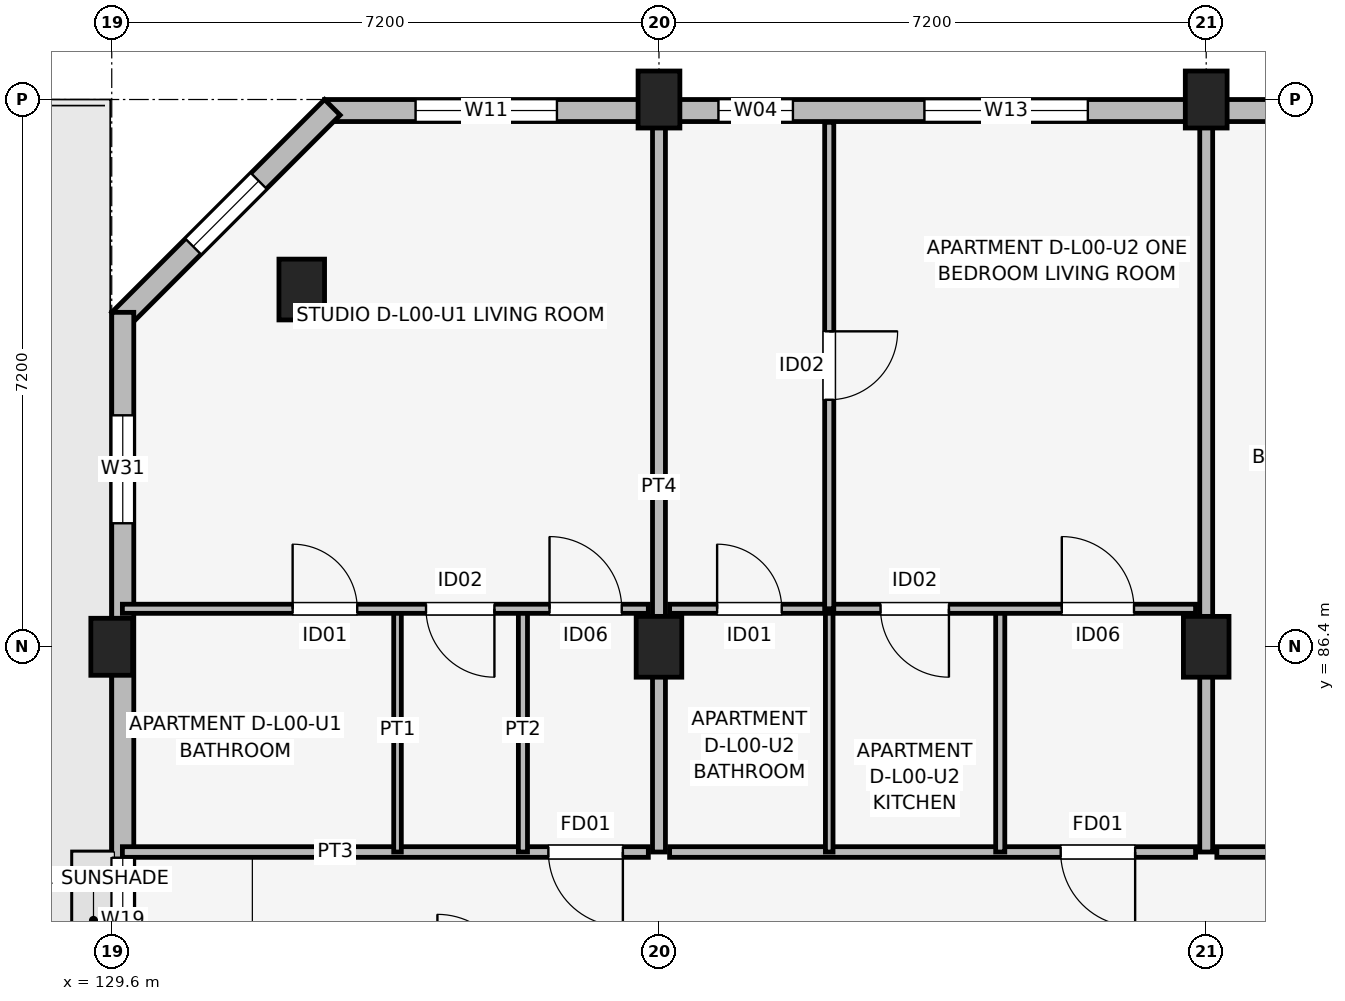
"""IFC4 building model, lengths in metres.
Left out: names, types, materials, properties, quantities, classifications, styles, units other than length and angle.
Written with IfcOpenShell. Run it as: python <this file> out.ifc"""

import sys

from ifc_helpers import new_model, si_unit, direction, frame, frame_2d, origin, origin_2d, place, context, subcontext, project, spatial, rectangle, extrude, element, fill, save


model = new_model("IFC4")
c1 = context("Model", 3, precision=1e-05, world=origin(), true_north=direction((0.0, 1.0)))
c2 = subcontext(c1, "Body", "Model", "MODEL_VIEW")
j1 = project(units=[si_unit("LENGTHUNIT", "METRE"), si_unit("PLANEANGLEUNIT", "RADIAN")], contexts=[c1])
p1 = place(None, origin())
s1 = spatial("IfcSite", under=j1, at=p1, CompositionType="ELEMENT")
p2 = place(p1, origin())
s2 = spatial("IfcBuilding", under=s1, at=p2, CompositionType="ELEMENT")
p3 = place(p2, origin())
s3 = spatial("IfcBuildingStorey", under=s2, at=p3, CompositionType="ELEMENT", Elevation=0.0)
p4 = place(p3, frame((129.6, 86.4, 0.0), z_axis=(0.0, 0.0, 1.0), x_axis=(1.0, 0.0, 0.0)))
e1 = element("IfcColumn", 1, at=p4, inside=s3, PredefinedType="COLUMN", context=c2, shape_type="SweptSolid", body=[
    extrude(rectangle(XDim=0.55, YDim=0.75, at=origin_2d()), origin(), (0.0, 0.0, 1.0), 4.5),
])
for number, where, z_axis, x_axis in (
    (2, (132.1, 91.1, 0.0), (0.0, 0.0, 1.0), (1.0, 0.0, 0.0)),
    (3, (136.8, 86.4, 0.0), (0.0, 0.0, 1.0), (1.0, 0.0, 0.0)),
):
    element("IfcColumn", number, at=place(p3, frame(where, z_axis=z_axis, x_axis=x_axis)), inside=s3, PredefinedType="COLUMN", context=c2, shape_type="SweptSolid", body=[
        extrude(rectangle(XDim=0.6, YDim=0.8, at=origin_2d()), origin(), (0.0, 0.0, 1.0), 4.5),
    ])
p5 = place(p3, frame((136.8, 93.6, 0.0), z_axis=(0.0, 0.0, 1.0), x_axis=(1.0, 0.0, 0.0)))
e4 = element("IfcColumn", 4, at=p5, inside=s3, PredefinedType="COLUMN", context=c2, shape_type="SweptSolid", body=[
    extrude(rectangle(XDim=0.55, YDim=0.75, at=origin_2d()), origin(), (0.0, 0.0, 1.0), 4.5),
])
p6 = place(p3, frame((144.0, 86.4, 0.0), z_axis=(0.0, 0.0, 1.0), x_axis=(1.0, 0.0, 0.0)))
e5 = element("IfcColumn", 5, at=p6, inside=s3, PredefinedType="COLUMN", context=c2, shape_type="SweptSolid", body=[
    extrude(rectangle(XDim=0.6, YDim=0.8, at=origin_2d()), origin(), (0.0, 0.0, 1.0), 4.5),
])
p7 = place(p3, frame((144.0, 93.6, 0.0), z_axis=(0.0, 0.0, 1.0), x_axis=(1.0, 0.0, 0.0)))
e6 = element("IfcColumn", 6, at=p7, inside=s3, PredefinedType="COLUMN", context=c2, shape_type="SweptSolid", body=[
    extrude(rectangle(XDim=0.55, YDim=0.75, at=origin_2d()), origin(), (0.0, 0.0, 1.0), 4.5),
])
p8 = place(p3, frame((162.8, 93.455, 0.0), z_axis=(0.0, 0.0, 1.0), x_axis=(-1.0, 0.0, 0.0)))
e7 = element("IfcWall", 7, at=p8, inside=s3, PredefinedType="SOLIDWALL", context=c2, shape_type="SweptSolid", body=[
    extrude(rectangle(XDim=30.4, YDim=0.29, at=frame_2d((15.2, 0.0))), origin(), (0.0, 0.0, 1.0), 3.33),
])
p9 = place(p8, frame((17.65, 0.0, 0.0), z_axis=(0.0, 0.0, 1.0), x_axis=(-1.0, 0.0, 0.0)))
e8 = element("IfcOpeningElement", 8, at=p9, cuts=e7, PredefinedType="OPENING", context=c2, shape_type="SweptSolid", body=[
    extrude(rectangle(XDim=1.8, YDim=2.4, at=frame_2d((0.9, 1.2))), frame((0.0, 0.155, 0.0), z_axis=(0.0, -1.0, 0.0), x_axis=(1.0, 0.0, 0.0)), (0.0, 0.0, 1.0), 0.31),
])
p10 = place(p8, frame((27.343, 0.0, 0.7)))
e9 = element("IfcOpeningElement", 9, at=p10, cuts=e7, PredefinedType="OPENING", context=c2, shape_type="SweptSolid", body=[
    extrude(rectangle(XDim=1.86, YDim=1.6, at=frame_2d((0.93, 0.8))), frame((0.0, 0.155, 0.0), z_axis=(0.0, -1.0, 0.0), x_axis=(1.0, 0.0, 0.0)), (0.0, 0.0, 1.0), 0.31),
])
p11 = place(p8, frame((24.238, 0.0, 0.75)))
e10 = element("IfcOpeningElement", 10, at=p11, cuts=e7, PredefinedType="OPENING", context=c2, shape_type="SweptSolid", body=[
    extrude(rectangle(XDim=0.98, YDim=1.45, at=frame_2d((0.49, 0.725))), frame((0.0, 0.155, 0.0), z_axis=(0.0, -1.0, 0.0), x_axis=(1.0, 0.0, 0.0)), (0.0, 0.0, 1.0), 0.31),
])
p12 = place(p8, frame((20.357, 0.0, 0.7)))
e11 = element("IfcOpeningElement", 11, at=p12, cuts=e7, PredefinedType="OPENING", context=c2, shape_type="SweptSolid", body=[
    extrude(rectangle(XDim=2.15, YDim=1.65, at=frame_2d((1.075, 0.825))), frame((0.0, 0.155, 0.0), z_axis=(0.0, -1.0, 0.0), x_axis=(1.0, 0.0, 0.0)), (0.0, 0.0, 1.0), 0.31),
])
p13 = place(p8, frame((6.85, 0.0, 0.7)))
e12 = element("IfcOpeningElement", 12, at=p13, cuts=e7, PredefinedType="OPENING", context=c2, shape_type="SweptSolid", body=[
    extrude(rectangle(XDim=2.3, YDim=1.65, at=frame_2d((1.15, 0.825))), frame((0.0, 0.155, 0.0), z_axis=(0.0, -1.0, 0.0), x_axis=(1.0, 0.0, 0.0)), (0.0, 0.0, 1.0), 0.31),
])
p14 = place(p8, frame((2.583, 0.0, 0.75)))
e13 = element("IfcOpeningElement", 13, at=p14, cuts=e7, PredefinedType="OPENING", context=c2, shape_type="SweptSolid", body=[
    extrude(rectangle(XDim=1.34, YDim=1.55, at=frame_2d((0.67, 0.775))), frame((0.0, 0.155, 0.0), z_axis=(0.0, -1.0, 0.0), x_axis=(1.0, 0.0, 0.0)), (0.0, 0.0, 1.0), 0.31),
])
p15 = place(p8, frame((0.555, 0.0, 0.75)))
e14 = element("IfcOpeningElement", 14, at=p15, cuts=e7, PredefinedType="OPENING", context=c2, shape_type="SweptSolid", body=[
    extrude(rectangle(XDim=1.46, YDim=1.55, at=frame_2d((0.73, 0.775))), frame((0.0, 0.155, 0.0), z_axis=(0.0, -1.0, 0.0), x_axis=(1.0, 0.0, 0.0)), (0.0, 0.0, 1.0), 0.31),
])
p16 = place(p3, frame((132.502, 93.498, 0.0), z_axis=(0.0, 0.0, 1.0), x_axis=(-0.707106781187, -0.707106781187, 0.0)))
e15 = element("IfcWall", 15, at=p16, inside=s3, PredefinedType="SOLIDWALL", context=c2, shape_type="SweptSolid", body=[
    extrude(rectangle(XDim=3.96, YDim=0.29, at=frame_2d((1.98, 0.0))), origin(), (0.0, 0.0, 1.0), 4.175),
])
p17 = place(p16, frame((1.37, 0.0, 0.85)))
e16 = element("IfcOpeningElement", 16, at=p17, cuts=e15, PredefinedType="OPENING", context=c2, shape_type="SweptSolid", body=[
    extrude(rectangle(XDim=1.22, YDim=1.5, at=frame_2d((0.61, 0.75))), frame((0.0, 0.155, 0.0), z_axis=(0.0, -1.0, 0.0), x_axis=(1.0, 0.0, 0.0)), (0.0, 0.0, 1.0), 0.31),
])
p18 = place(p3, frame((129.745, 90.8, 0.0), z_axis=(0.0, 0.0, 1.0), x_axis=(0.0, -1.0, 0.0)))
e17 = element("IfcWall", 17, at=p18, inside=s3, PredefinedType="SOLIDWALL", context=c2, shape_type="SweptSolid", body=[
    extrude(rectangle(XDim=16.0, YDim=0.29, at=frame_2d((8.0, 0.0))), origin(), (0.0, 0.0, 1.0), 3.33),
])
p19 = place(p18, frame((7.175, 0.0, 1.05)))
e18 = element("IfcOpeningElement", 18, at=p19, cuts=e17, PredefinedType="OPENING", context=c2, shape_type="SweptSolid", body=[
    extrude(rectangle(XDim=1.65, YDim=1.15, at=frame_2d((0.825, 0.575))), frame((0.0, 0.155, 0.0), z_axis=(0.0, -1.0, 0.0), x_axis=(1.0, 0.0, 0.0)), (0.0, 0.0, 1.0), 0.31),
])
p20 = place(p18, frame((1.355, 0.0, 0.75)))
e19 = element("IfcOpeningElement", 19, at=p20, cuts=e17, PredefinedType="OPENING", context=c2, shape_type="SweptSolid", body=[
    extrude(rectangle(XDim=1.42, YDim=1.6, at=frame_2d((0.71, 0.8))), frame((0.0, 0.155, 0.0), z_axis=(0.0, -1.0, 0.0), x_axis=(1.0, 0.0, 0.0)), (0.0, 0.0, 1.0), 0.31),
])
p21 = place(p3, frame((129.74, 83.7, 0.0), z_axis=(0.0, 0.0, 1.0), x_axis=(1.0, 0.0, 0.0)))
e20 = element("IfcWall", 20, at=p21, inside=s3, PredefinedType="PARTITIONING", context=c2, shape_type="SweptSolid", body=[
    extrude(rectangle(XDim=6.92, YDim=0.14, at=frame_2d((3.46, 0.0))), origin(), (0.0, 0.0, 1.0), 3.15),
])
p22 = place(p21, frame((6.585, 0.0, 0.0), z_axis=(0.0, 0.0, 1.0), x_axis=(-1.0, 0.0, 0.0)))
e21 = element("IfcOpeningElement", 21, at=p22, cuts=e20, PredefinedType="OPENING", context=c2, shape_type="SweptSolid", body=[
    extrude(rectangle(XDim=0.98, YDim=2.1, at=frame_2d((0.49, 1.05))), frame((0.0, 0.08, 0.0), z_axis=(0.0, -1.0, 0.0), x_axis=(1.0, 0.0, 0.0)), (0.0, 0.0, 1.0), 0.16),
])
p23 = place(p3, frame((133.36, 83.7, 0.0), z_axis=(0.0, 0.0, 1.0), x_axis=(0.0, 1.0, 0.0)))
e22 = element("IfcWall", 22, at=p23, inside=s3, PredefinedType="PARTITIONING", context=c2, shape_type="SweptSolid", body=[
    extrude(rectangle(XDim=3.2, YDim=0.1, at=frame_2d((1.6, 0.0))), origin(), (0.0, 0.0, 1.0), 3.15),
])
p24 = place(p3, frame((135.01, 83.7, 0.0), z_axis=(0.0, 0.0, 1.0), x_axis=(0.0, 1.0, 0.0)))
e23 = element("IfcWall", 23, at=p24, inside=s3, PredefinedType="PARTITIONING", context=c2, shape_type="SweptSolid", body=[
    extrude(rectangle(XDim=3.2, YDim=0.12, at=frame_2d((1.6, 0.0))), origin(), (0.0, 0.0, 1.0), 3.15),
])
p25 = place(p3, frame((129.74, 86.9, 0.0), z_axis=(0.0, 0.0, 1.0), x_axis=(1.0, 0.0, 0.0)))
e24 = element("IfcWall", 24, at=p25, inside=s3, PredefinedType="PARTITIONING", context=c2, shape_type="SweptSolid", body=[
    extrude(rectangle(XDim=6.92, YDim=0.12, at=frame_2d((3.46, 0.0))), origin(), (0.0, 0.0, 1.0), 3.15),
])
p26 = place(p25, frame((2.24, 0.0, 0.0)))
e25 = element("IfcOpeningElement", 25, at=p26, cuts=e24, PredefinedType="OPENING", context=c2, shape_type="SweptSolid", body=[
    extrude(rectangle(XDim=0.85, YDim=2.08, at=frame_2d((0.425, 1.04))), frame((0.0, 0.07, 0.0), z_axis=(0.0, -1.0, 0.0), x_axis=(1.0, 0.0, 0.0)), (0.0, 0.0, 1.0), 0.14),
])
p27 = place(p25, frame((4.895, 0.0, 0.0), z_axis=(0.0, 0.0, 1.0), x_axis=(-1.0, 0.0, 0.0)))
e26 = element("IfcOpeningElement", 26, at=p27, cuts=e24, PredefinedType="OPENING", context=c2, shape_type="SweptSolid", body=[
    extrude(rectangle(XDim=0.9, YDim=2.08, at=frame_2d((0.45, 1.04))), frame((0.0, 0.07, 0.0), z_axis=(0.0, -1.0, 0.0), x_axis=(1.0, 0.0, 0.0)), (0.0, 0.0, 1.0), 0.14),
])
p28 = place(p25, frame((5.62, 0.0, 0.0)))
e27 = element("IfcOpeningElement", 27, at=p28, cuts=e24, PredefinedType="OPENING", context=c2, shape_type="SweptSolid", body=[
    extrude(rectangle(XDim=0.95, YDim=2.08, at=frame_2d((0.475, 1.04))), frame((0.0, 0.07, 0.0), z_axis=(0.0, -1.0, 0.0), x_axis=(1.0, 0.0, 0.0)), (0.0, 0.0, 1.0), 0.14),
])
p29 = place(p3, frame((136.8, 83.7, 0.0), z_axis=(0.0, 0.0, 1.0), x_axis=(0.0, 1.0, 0.0)))
e28 = element("IfcWall", 28, at=p29, inside=s3, PredefinedType="PARTITIONING", context=c2, shape_type="SweptSolid", body=[
    extrude(rectangle(XDim=9.6, YDim=0.17, at=frame_2d((4.8, 0.0))), origin(), (0.0, 0.0, 1.0), 3.15),
])
p30 = place(p3, frame((136.94, 83.7, 0.0), z_axis=(0.0, 0.0, 1.0), x_axis=(1.0, 0.0, 0.0)))
e29 = element("IfcWall", 29, at=p30, inside=s3, PredefinedType="PARTITIONING", context=c2, shape_type="SweptSolid", body=[
    extrude(rectangle(XDim=6.92, YDim=0.14, at=frame_2d((3.46, 0.0))), origin(), (0.0, 0.0, 1.0), 3.15),
])
p31 = place(p30, frame((6.125, 0.0, 0.0), z_axis=(0.0, 0.0, 1.0), x_axis=(-1.0, 0.0, 0.0)))
e30 = element("IfcOpeningElement", 30, at=p31, cuts=e29, PredefinedType="OPENING", context=c2, shape_type="SweptSolid", body=[
    extrude(rectangle(XDim=0.98, YDim=2.1, at=frame_2d((0.49, 1.05))), frame((0.0, 0.08, 0.0), z_axis=(0.0, -1.0, 0.0), x_axis=(1.0, 0.0, 0.0)), (0.0, 0.0, 1.0), 0.16),
])
p32 = place(p3, frame((139.04, 83.7, 0.0), z_axis=(0.0, 0.0, 1.0), x_axis=(0.0, 1.0, 0.0)))
e31 = element("IfcWall", 31, at=p32, inside=s3, PredefinedType="PARTITIONING", context=c2, shape_type="SweptSolid", body=[
    extrude(rectangle(XDim=3.2, YDim=0.1, at=frame_2d((1.6, 0.0))), origin(), (0.0, 0.0, 1.0), 3.15),
])
p33 = place(p3, frame((141.29, 83.7, 0.0), z_axis=(0.0, 0.0, 1.0), x_axis=(0.0, 1.0, 0.0)))
e32 = element("IfcWall", 32, at=p33, inside=s3, PredefinedType="PARTITIONING", context=c2, shape_type="SweptSolid", body=[
    extrude(rectangle(XDim=3.2, YDim=0.12, at=frame_2d((1.6, 0.0))), origin(), (0.0, 0.0, 1.0), 3.15),
])
p34 = place(p3, frame((136.94, 86.9, 0.0), z_axis=(0.0, 0.0, 1.0), x_axis=(1.0, 0.0, 0.0)))
e33 = element("IfcWall", 33, at=p34, inside=s3, PredefinedType="PARTITIONING", context=c2, shape_type="SweptSolid", body=[
    extrude(rectangle(XDim=6.92, YDim=0.12, at=frame_2d((3.46, 0.0))), origin(), (0.0, 0.0, 1.0), 3.15),
])
p35 = place(p34, frame((0.625, 0.0, 0.0)))
e34 = element("IfcOpeningElement", 34, at=p35, cuts=e33, PredefinedType="OPENING", context=c2, shape_type="SweptSolid", body=[
    extrude(rectangle(XDim=0.85, YDim=2.08, at=frame_2d((0.425, 1.04))), frame((0.0, 0.07, 0.0), z_axis=(0.0, -1.0, 0.0), x_axis=(1.0, 0.0, 0.0)), (0.0, 0.0, 1.0), 0.14),
])
p36 = place(p34, frame((3.675, 0.0, 0.0), z_axis=(0.0, 0.0, 1.0), x_axis=(-1.0, 0.0, 0.0)))
e35 = element("IfcOpeningElement", 35, at=p36, cuts=e33, PredefinedType="OPENING", context=c2, shape_type="SweptSolid", body=[
    extrude(rectangle(XDim=0.9, YDim=2.08, at=frame_2d((0.45, 1.04))), frame((0.0, 0.07, 0.0), z_axis=(0.0, -1.0, 0.0), x_axis=(1.0, 0.0, 0.0)), (0.0, 0.0, 1.0), 0.14),
])
p37 = place(p34, frame((5.16, 0.0, 0.0)))
e36 = element("IfcOpeningElement", 36, at=p37, cuts=e33, PredefinedType="OPENING", context=c2, shape_type="SweptSolid", body=[
    extrude(rectangle(XDim=0.95, YDim=2.08, at=frame_2d((0.475, 1.04))), frame((0.0, 0.07, 0.0), z_axis=(0.0, -1.0, 0.0), x_axis=(1.0, 0.0, 0.0)), (0.0, 0.0, 1.0), 0.14),
])
p38 = place(p3, frame((139.04, 86.9, 0.0), z_axis=(0.0, 0.0, 1.0), x_axis=(0.0, 1.0, 0.0)))
e37 = element("IfcWall", 37, at=p38, inside=s3, PredefinedType="PARTITIONING", context=c2, shape_type="SweptSolid", body=[
    extrude(rectangle(XDim=6.4, YDim=0.12, at=frame_2d((3.2, 0.0))), origin(), (0.0, 0.0, 1.0), 3.15),
])
p39 = place(p38, frame((3.65, 0.0, 0.0), z_axis=(0.0, 0.0, 1.0), x_axis=(-1.0, 0.0, 0.0)))
e38 = element("IfcOpeningElement", 38, at=p39, cuts=e37, PredefinedType="OPENING", context=c2, shape_type="SweptSolid", body=[
    extrude(rectangle(XDim=0.9, YDim=2.08, at=frame_2d((0.45, 1.04))), frame((0.0, 0.07, 0.0), z_axis=(0.0, -1.0, 0.0), x_axis=(1.0, 0.0, 0.0)), (0.0, 0.0, 1.0), 0.14),
])
p40 = place(p3, frame((144.0, 83.7, 0.0), z_axis=(0.0, 0.0, 1.0), x_axis=(0.0, 1.0, 0.0)))
e39 = element("IfcWall", 39, at=p40, inside=s3, PredefinedType="PARTITIONING", context=c2, shape_type="SweptSolid", body=[
    extrude(rectangle(XDim=9.6, YDim=0.17, at=frame_2d((4.8, 0.0))), origin(), (0.0, 0.0, 1.0), 3.15),
])
p41 = place(p3, frame((144.14, 83.7, 0.0), z_axis=(0.0, 0.0, 1.0), x_axis=(1.0, 0.0, 0.0)))
e40 = element("IfcWall", 40, at=p41, inside=s3, PredefinedType="PARTITIONING", context=c2, shape_type="SweptSolid", body=[
    extrude(rectangle(XDim=6.92, YDim=0.14, at=frame_2d((3.46, 0.0))), origin(), (0.0, 0.0, 1.0), 3.15),
])
p42 = place(p41, frame((2.65, 0.0, 0.0), z_axis=(0.0, 0.0, 1.0), x_axis=(-1.0, 0.0, 0.0)))
e41 = element("IfcOpeningElement", 41, at=p42, cuts=e40, PredefinedType="OPENING", context=c2, shape_type="SweptSolid", body=[
    extrude(rectangle(XDim=1.4, YDim=2.22, at=frame_2d((0.7, 1.11))), frame((0.0, 0.08, 0.0), z_axis=(0.0, -1.0, 0.0), x_axis=(1.0, 0.0, 0.0)), (0.0, 0.0, 1.0), 0.16),
])
p43 = place(p41, frame((5.07, 0.0, 0.0)))
e42 = element("IfcOpeningElement", 42, at=p43, cuts=e40, PredefinedType="OPENING", context=c2, shape_type="SweptSolid", body=[
    extrude(rectangle(XDim=1.0, YDim=2.12, at=frame_2d((0.5, 1.06))), frame((0.0, 0.08, 0.0), z_axis=(0.0, -1.0, 0.0), x_axis=(1.0, 0.0, 0.0)), (0.0, 0.0, 1.0), 0.16),
])
p44 = place(p17, origin())
e43 = element("IfcWindow", 43, at=p44, inside=s3, PartitioningType="SINGLE_PANEL", PredefinedType="WINDOW", context=c2, shape_type="SweptSolid", body=[
    extrude(rectangle(XDim=1.22, YDim=1.5, at=frame_2d((0.61, 0.75))), frame((0.0, 0.03, 0.0), z_axis=(0.0, -1.0, 0.0), x_axis=(1.0, 0.0, 0.0)), (0.0, 0.0, 1.0), 0.06),
])
fill(e16, e43)
p45 = place(p10, origin())
e44 = element("IfcWindow", 44, at=p45, inside=s3, PartitioningType="SINGLE_PANEL", PredefinedType="WINDOW", context=c2, shape_type="SweptSolid", body=[
    extrude(rectangle(XDim=1.86, YDim=1.6, at=frame_2d((0.93, 0.8))), frame((0.0, 0.03, 0.0), z_axis=(0.0, -1.0, 0.0), x_axis=(1.0, 0.0, 0.0)), (0.0, 0.0, 1.0), 0.06),
])
fill(e9, e44)
p46 = place(p11, origin())
e45 = element("IfcWindow", 45, at=p46, inside=s3, PartitioningType="SINGLE_PANEL", PredefinedType="WINDOW", context=c2, shape_type="SweptSolid", body=[
    extrude(rectangle(XDim=0.98, YDim=1.45, at=frame_2d((0.49, 0.725))), frame((0.0, 0.03, 0.0), z_axis=(0.0, -1.0, 0.0), x_axis=(1.0, 0.0, 0.0)), (0.0, 0.0, 1.0), 0.06),
])
fill(e10, e45)
p47 = place(p12, origin())
e46 = element("IfcWindow", 46, at=p47, inside=s3, PartitioningType="SINGLE_PANEL", PredefinedType="WINDOW", context=c2, shape_type="SweptSolid", body=[
    extrude(rectangle(XDim=2.15, YDim=1.65, at=frame_2d((1.075, 0.825))), frame((0.0, 0.03, 0.0), z_axis=(0.0, -1.0, 0.0), x_axis=(1.0, 0.0, 0.0)), (0.0, 0.0, 1.0), 0.06),
])
fill(e11, e46)
p48 = place(p19, origin())
e47 = element("IfcWindow", 47, at=p48, inside=s3, PartitioningType="SINGLE_PANEL", PredefinedType="WINDOW", context=c2, shape_type="SweptSolid", body=[
    extrude(rectangle(XDim=1.65, YDim=1.15, at=frame_2d((0.825, 0.575))), frame((0.0, 0.03, 0.0), z_axis=(0.0, -1.0, 0.0), x_axis=(1.0, 0.0, 0.0)), (0.0, 0.0, 1.0), 0.06),
])
fill(e18, e47)
p49 = place(p20, origin())
e48 = element("IfcWindow", 48, at=p49, inside=s3, PartitioningType="SINGLE_PANEL", PredefinedType="WINDOW", context=c2, shape_type="SweptSolid", body=[
    extrude(rectangle(XDim=1.42, YDim=1.6, at=frame_2d((0.71, 0.8))), frame((0.0, 0.03, 0.0), z_axis=(0.0, -1.0, 0.0), x_axis=(1.0, 0.0, 0.0)), (0.0, 0.0, 1.0), 0.06),
])
fill(e19, e48)
p50 = place(p22, origin())
e49 = element("IfcDoor", 49, at=p50, inside=s3, OperationType="SINGLE_SWING_RIGHT", PredefinedType="DOOR", context=c2, shape_type="SweptSolid", body=[
    extrude(rectangle(XDim=0.98, YDim=2.1, at=frame_2d((0.49, 1.05))), frame((0.0, 0.025, 0.0), z_axis=(0.0, -1.0, 0.0), x_axis=(1.0, 0.0, 0.0)), (0.0, 0.0, 1.0), 0.05),
])
fill(e21, e49)
p51 = place(p26, origin())
e50 = element("IfcDoor", 50, at=p51, inside=s3, OperationType="SINGLE_SWING_LEFT", PredefinedType="DOOR", context=c2, shape_type="SweptSolid", body=[
    extrude(rectangle(XDim=0.85, YDim=2.08, at=frame_2d((0.425, 1.04))), frame((0.0, 0.025, 0.0), z_axis=(0.0, -1.0, 0.0), x_axis=(1.0, 0.0, 0.0)), (0.0, 0.0, 1.0), 0.05),
])
fill(e25, e50)
p52 = place(p27, origin())
e51 = element("IfcDoor", 51, at=p52, inside=s3, OperationType="SINGLE_SWING_RIGHT", PredefinedType="DOOR", context=c2, shape_type="SweptSolid", body=[
    extrude(rectangle(XDim=0.9, YDim=2.08, at=frame_2d((0.45, 1.04))), frame((0.0, 0.025, 0.0), z_axis=(0.0, -1.0, 0.0), x_axis=(1.0, 0.0, 0.0)), (0.0, 0.0, 1.0), 0.05),
])
fill(e26, e51)
p53 = place(p28, origin())
e52 = element("IfcDoor", 52, at=p53, inside=s3, OperationType="SINGLE_SWING_LEFT", PredefinedType="DOOR", context=c2, shape_type="SweptSolid", body=[
    extrude(rectangle(XDim=0.95, YDim=2.08, at=frame_2d((0.475, 1.04))), frame((0.0, 0.025, 0.0), z_axis=(0.0, -1.0, 0.0), x_axis=(1.0, 0.0, 0.0)), (0.0, 0.0, 1.0), 0.05),
])
fill(e27, e52)
p54 = place(p31, origin())
e53 = element("IfcDoor", 53, at=p54, inside=s3, OperationType="SINGLE_SWING_RIGHT", PredefinedType="DOOR", context=c2, shape_type="SweptSolid", body=[
    extrude(rectangle(XDim=0.98, YDim=2.1, at=frame_2d((0.49, 1.05))), frame((0.0, 0.025, 0.0), z_axis=(0.0, -1.0, 0.0), x_axis=(1.0, 0.0, 0.0)), (0.0, 0.0, 1.0), 0.05),
])
fill(e30, e53)
p55 = place(p35, origin())
e54 = element("IfcDoor", 54, at=p55, inside=s3, OperationType="SINGLE_SWING_LEFT", PredefinedType="DOOR", context=c2, shape_type="SweptSolid", body=[
    extrude(rectangle(XDim=0.85, YDim=2.08, at=frame_2d((0.425, 1.04))), frame((0.0, 0.025, 0.0), z_axis=(0.0, -1.0, 0.0), x_axis=(1.0, 0.0, 0.0)), (0.0, 0.0, 1.0), 0.05),
])
fill(e34, e54)
p56 = place(p36, origin())
e55 = element("IfcDoor", 55, at=p56, inside=s3, OperationType="SINGLE_SWING_RIGHT", PredefinedType="DOOR", context=c2, shape_type="SweptSolid", body=[
    extrude(rectangle(XDim=0.9, YDim=2.08, at=frame_2d((0.45, 1.04))), frame((0.0, 0.025, 0.0), z_axis=(0.0, -1.0, 0.0), x_axis=(1.0, 0.0, 0.0)), (0.0, 0.0, 1.0), 0.05),
])
fill(e35, e55)
p57 = place(p37, origin())
e56 = element("IfcDoor", 56, at=p57, inside=s3, OperationType="SINGLE_SWING_LEFT", PredefinedType="DOOR", context=c2, shape_type="SweptSolid", body=[
    extrude(rectangle(XDim=0.95, YDim=2.08, at=frame_2d((0.475, 1.04))), frame((0.0, 0.025, 0.0), z_axis=(0.0, -1.0, 0.0), x_axis=(1.0, 0.0, 0.0)), (0.0, 0.0, 1.0), 0.05),
])
fill(e36, e56)
p58 = place(p39, origin())
e57 = element("IfcDoor", 57, at=p58, inside=s3, OperationType="SINGLE_SWING_RIGHT", PredefinedType="DOOR", context=c2, shape_type="SweptSolid", body=[
    extrude(rectangle(XDim=0.9, YDim=2.08, at=frame_2d((0.45, 1.04))), frame((0.0, 0.025, 0.0), z_axis=(0.0, -1.0, 0.0), x_axis=(1.0, 0.0, 0.0)), (0.0, 0.0, 1.0), 0.05),
])
fill(e38, e57)
save(model, sys.argv[1])
